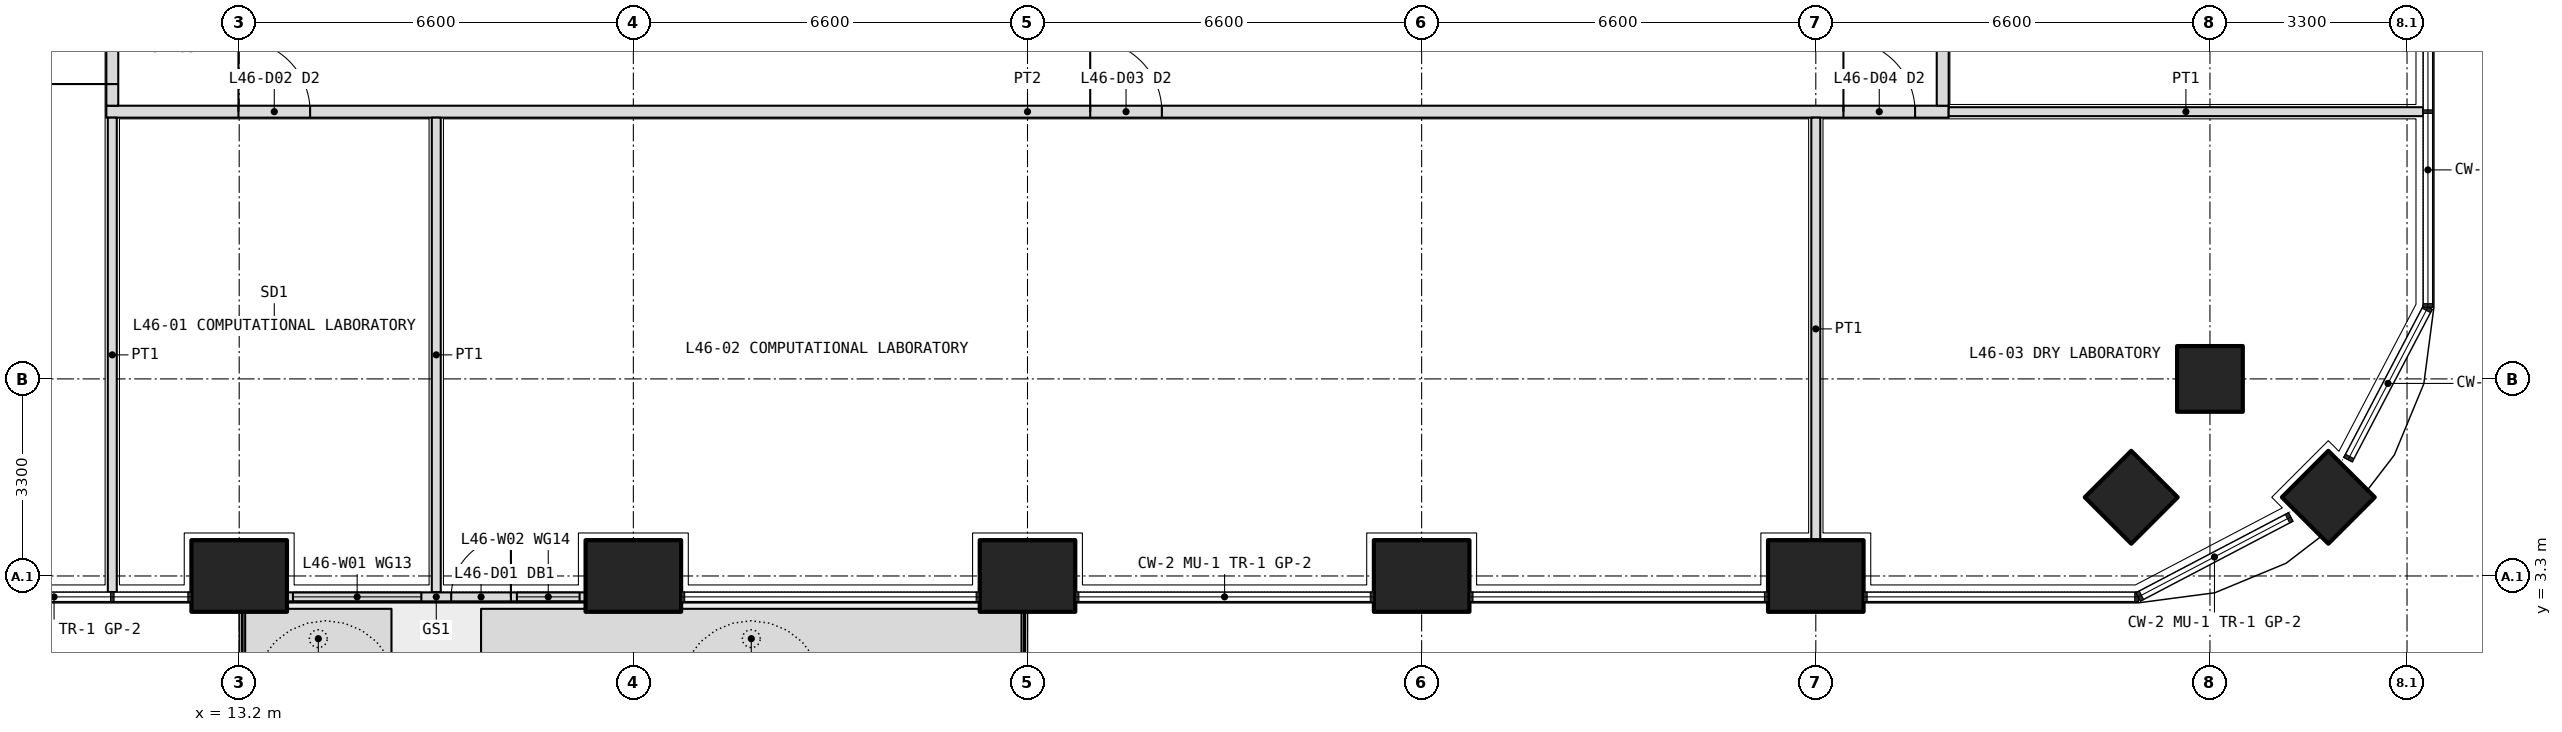
"""IFC4 building model, lengths in metres.
Left out: names, types, materials, properties, quantities, classifications, styles, units other than length and angle.
Written with IfcOpenShell. Run it as: python <this file> out.ifc"""

import sys

from ifc_helpers import new_model, si_unit, direction, frame, frame_2d, origin, origin_2d, place, context, subcontext, project, spatial, polyline, rectangle, outline, extrude, element, fill, save


model = new_model("IFC4")
c1 = context("Model", 3, precision=1e-05, world=origin(), true_north=direction((0.0, 1.0)))
c2 = subcontext(c1, "Body", "Model", "MODEL_VIEW")
j1 = project(units=[si_unit("LENGTHUNIT", "METRE"), si_unit("PLANEANGLEUNIT", "RADIAN")], contexts=[c1])
p1 = place(None, origin())
s1 = spatial("IfcSite", under=j1, at=p1, CompositionType="ELEMENT")
p2 = place(p1, origin())
s2 = spatial("IfcBuilding", under=s1, at=p2, CompositionType="ELEMENT")
p3 = place(p2, frame((0.0, 0.0, 201.9)))
s3 = spatial("IfcBuildingStorey", under=s2, at=p3, CompositionType="ELEMENT", Elevation=201.9)
p4 = place(p3, frame((48.182, 4.618, 0.0), z_axis=(0.0, 0.0, 1.0), x_axis=(0.707106781187, 0.707106781187, 0.0)))
e1 = element("IfcColumn", 1, at=p4, inside=s3, PredefinedType="COLUMN", context=c2, shape_type="SweptSolid", body=[
    extrude(rectangle(XDim=1.1, YDim=1.1, at=origin_2d()), origin(), (0.0, 0.0, 1.0), 4.2),
])
for number, where, z_axis, x_axis in (
    (2, (13.2, 3.3, 0.0), (0.0, 0.0, 1.0), (1.0, 0.0, 0.0)),
    (3, (19.8, 3.3, 0.0), (0.0, 0.0, 1.0), (1.0, 0.0, 0.0)),
    (4, (26.4, 3.3, 0.0), (0.0, 0.0, 1.0), (1.0, 0.0, 0.0)),
    (5, (33.0, 3.3, 0.0), (0.0, 0.0, 1.0), (1.0, 0.0, 0.0)),
    (6, (39.6, 3.3, 0.0), (0.0, 0.0, 1.0), (1.0, 0.0, 0.0)),
):
    element("IfcColumn", number, at=place(p3, frame(where, z_axis=z_axis, x_axis=x_axis)), inside=s3, PredefinedType="COLUMN", context=c2, shape_type="SweptSolid", body=[
        extrude(rectangle(XDim=1.6, YDim=1.2, at=origin_2d()), origin(), (0.0, 0.0, 1.0), 4.2),
    ])
for number, where, z_axis, x_axis in (
    (7, (46.2, 6.6, 0.0), (0.0, 0.0, 1.0), (1.0, 0.0, 0.0)),
    (8, (44.882, 4.618, 0.0), (0.0, 0.0, 1.0), (0.707, 0.707, 0.0)),
):
    element("IfcColumn", number, at=place(p3, frame(where, z_axis=z_axis, x_axis=x_axis)), inside=s3, PredefinedType="COLUMN", context=c2, shape_type="SweptSolid", body=[
        extrude(rectangle(XDim=1.1, YDim=1.1, at=origin_2d()), origin(), (0.0, 0.0, 1.0), 4.2),
    ])
p5 = place(p3, origin())
e9 = element("IfcWall", 9, at=p5, inside=s3, PredefinedType="USERDEFINED", context=c2, shape_type="SweptSolid", body=[
    extrude(outline(polyline([(13.3, 1.75), (15.75, 1.75), (15.75, 2.75), (13.3, 2.75), (13.3, 1.75)]), holes=[polyline([(13.45, 1.9), (15.6, 1.9), (15.6, 2.6), (13.45, 2.6), (13.45, 1.9)])]), origin(), (0.0, 0.0, 1.0), 1.05),
])
p6 = place(p3, origin())
e10 = element("IfcWall", 10, at=p6, inside=s3, PredefinedType="USERDEFINED", context=c2, shape_type="SweptSolid", body=[
    extrude(outline(polyline([(17.25, 1.75), (26.3, 1.75), (26.3, 2.75), (17.25, 2.75), (17.25, 1.75)]), holes=[polyline([(17.4, 1.9), (26.15, 1.9), (26.15, 2.6), (17.4, 2.6), (17.4, 1.9)])]), origin(), (0.0, 0.0, 1.0), 1.05),
])
p7 = place(p3, frame((14.0, 2.95, 0.0), z_axis=(0.0, 0.0, 1.0), x_axis=(1.0, 0.0, 0.0)))
e11 = element("IfcWall", 11, at=p7, inside=s3, PredefinedType="SOLIDWALL", context=c2, shape_type="SweptSolid", body=[
    extrude(rectangle(XDim=5.0, YDim=0.15, at=frame_2d((2.5, 0.0))), origin(), (0.0, 0.0, 1.0), 2.7),
])
p8 = place(p7, frame((2.75, 0.0, 0.0)))
e12 = element("IfcOpeningElement", 12, at=p8, cuts=e11, PredefinedType="OPENING", context=c2, shape_type="SweptSolid", body=[
    extrude(rectangle(XDim=1.0, YDim=2.4, at=frame_2d((0.5, 1.2))), frame((0.0, 0.085, 0.0), z_axis=(0.0, -1.0, 0.0), x_axis=(1.0, 0.0, 0.0)), (0.0, 0.0, 1.0), 0.17),
])
p9 = place(p7, frame((0.1, 0.0, 0.1)))
e13 = element("IfcOpeningElement", 13, at=p9, cuts=e11, PredefinedType="OPENING", context=c2, shape_type="SweptSolid", body=[
    extrude(rectangle(XDim=2.15, YDim=2.3, at=frame_2d((1.075, 1.15))), frame((0.0, 0.085, 0.0), z_axis=(0.0, -1.0, 0.0), x_axis=(1.0, 0.0, 0.0)), (0.0, 0.0, 1.0), 0.17),
])
p10 = place(p7, frame((3.85, 0.0, 0.1)))
e14 = element("IfcOpeningElement", 14, at=p10, cuts=e11, PredefinedType="OPENING", context=c2, shape_type="SweptSolid", body=[
    extrude(rectangle(XDim=1.05, YDim=2.3, at=frame_2d((0.525, 1.15))), frame((0.0, 0.085, 0.0), z_axis=(0.0, -1.0, 0.0), x_axis=(1.0, 0.0, 0.0)), (0.0, 0.0, 1.0), 0.17),
])
p11 = place(p3, frame((10.975, 11.075, 0.0), z_axis=(0.0, 0.0, 1.0), x_axis=(1.0, 0.0, 0.0)))
e15 = element("IfcWall", 15, at=p11, inside=s3, PredefinedType="PARTITIONING", context=c2, shape_type="SweptSolid", body=[
    extrude(rectangle(XDim=30.85, YDim=0.2, at=frame_2d((15.425, 0.0))), origin(), (0.0, 0.0, 1.0), 2.85),
])
p12 = place(p11, frame((2.212, 0.0, 0.0)))
e16 = element("IfcOpeningElement", 16, at=p12, cuts=e15, PredefinedType="OPENING", context=c2, shape_type="SweptSolid", body=[
    extrude(rectangle(XDim=1.2, YDim=2.1, at=frame_2d((0.6, 1.05))), frame((0.0, 0.11, 0.0), z_axis=(0.0, -1.0, 0.0), x_axis=(1.0, 0.0, 0.0)), (0.0, 0.0, 1.0), 0.22),
])
p13 = place(p11, frame((16.475, 0.0, 0.0)))
e17 = element("IfcOpeningElement", 17, at=p13, cuts=e15, PredefinedType="OPENING", context=c2, shape_type="SweptSolid", body=[
    extrude(rectangle(XDim=1.2, YDim=2.1, at=frame_2d((0.6, 1.05))), frame((0.0, 0.11, 0.0), z_axis=(0.0, -1.0, 0.0), x_axis=(1.0, 0.0, 0.0)), (0.0, 0.0, 1.0), 0.22),
])
p14 = place(p11, frame((29.087, 0.0, 0.0)))
e18 = element("IfcOpeningElement", 18, at=p14, cuts=e15, PredefinedType="OPENING", context=c2, shape_type="SweptSolid", body=[
    extrude(rectangle(XDim=1.2, YDim=2.1, at=frame_2d((0.6, 1.05))), frame((0.0, 0.11, 0.0), z_axis=(0.0, -1.0, 0.0), x_axis=(1.0, 0.0, 0.0)), (0.0, 0.0, 1.0), 0.22),
])
p15 = place(p3, frame((11.075, 11.175, 0.0), z_axis=(0.0, 0.0, 1.0), x_axis=(0.0, 1.0, 0.0)))
e19 = element("IfcWall", 19, at=p15, inside=s3, PredefinedType="PARTITIONING", context=c2, shape_type="SweptSolid", body=[
    extrude(rectangle(XDim=18.525, YDim=0.2, at=frame_2d((9.262, 0.0))), origin(), (0.0, 0.0, 1.0), 2.85),
])
p16 = place(p15, frame((0.363, 0.0, 0.0)))
e20 = element("IfcOpeningElement", 20, at=p16, cuts=e19, PredefinedType="OPENING", context=c2, shape_type="SweptSolid", body=[
    extrude(rectangle(XDim=1.2, YDim=2.1, at=frame_2d((0.6, 1.05))), frame((0.0, 0.11, 0.0), z_axis=(0.0, -1.0, 0.0), x_axis=(1.0, 0.0, 0.0)), (0.0, 0.0, 1.0), 0.22),
])
p17 = place(p15, frame((3.125, 0.0, 0.0)))
e21 = element("IfcOpeningElement", 21, at=p17, cuts=e19, PredefinedType="OPENING", context=c2, shape_type="SweptSolid", body=[
    extrude(rectangle(XDim=1.0, YDim=2.1, at=frame_2d((0.5, 1.05))), frame((0.0, 0.11, 0.0), z_axis=(0.0, -1.0, 0.0), x_axis=(1.0, 0.0, 0.0)), (0.0, 0.0, 1.0), 0.22),
])
p18 = place(p15, frame((6.475, 0.0, 0.0)))
e22 = element("IfcOpeningElement", 22, at=p18, cuts=e19, PredefinedType="OPENING", context=c2, shape_type="SweptSolid", body=[
    extrude(rectangle(XDim=0.9, YDim=2.1, at=frame_2d((0.45, 1.05))), frame((0.0, 0.11, 0.0), z_axis=(0.0, -1.0, 0.0), x_axis=(1.0, 0.0, 0.0)), (0.0, 0.0, 1.0), 0.22),
])
p19 = place(p15, frame((9.675, 0.0, 0.0)))
e23 = element("IfcOpeningElement", 23, at=p19, cuts=e19, PredefinedType="OPENING", context=c2, shape_type="SweptSolid", body=[
    extrude(rectangle(XDim=0.9, YDim=2.1, at=frame_2d((0.45, 1.05))), frame((0.0, 0.11, 0.0), z_axis=(0.0, -1.0, 0.0), x_axis=(1.0, 0.0, 0.0)), (0.0, 0.0, 1.0), 0.22),
])
p20 = place(p15, frame((12.925, 0.0, 0.0)))
e24 = element("IfcOpeningElement", 24, at=p20, cuts=e19, PredefinedType="OPENING", context=c2, shape_type="SweptSolid", body=[
    extrude(rectangle(XDim=1.0, YDim=2.1, at=frame_2d((0.5, 1.05))), frame((0.0, 0.11, 0.0), z_axis=(0.0, -1.0, 0.0), x_axis=(1.0, 0.0, 0.0)), (0.0, 0.0, 1.0), 0.22),
])
p21 = place(p15, frame((16.275, 0.0, 0.0)))
e25 = element("IfcOpeningElement", 25, at=p21, cuts=e19, PredefinedType="OPENING", context=c2, shape_type="SweptSolid", body=[
    extrude(rectangle(XDim=1.2, YDim=2.1, at=frame_2d((0.6, 1.05))), frame((0.0, 0.11, 0.0), z_axis=(0.0, -1.0, 0.0), x_axis=(1.0, 0.0, 0.0)), (0.0, 0.0, 1.0), 0.22),
])
p22 = place(p3, frame((41.725, 11.175, 0.0), z_axis=(0.0, 0.0, 1.0), x_axis=(0.0, 1.0, 0.0)))
e26 = element("IfcWall", 26, at=p22, inside=s3, PredefinedType="PARTITIONING", context=c2, shape_type="SweptSolid", body=[
    extrude(rectangle(XDim=23.85, YDim=0.2, at=frame_2d((11.925, 0.0))), origin(), (0.0, 0.0, 1.0), 2.85),
])
p23 = place(p22, frame((3.762, 0.0, 0.0)))
e27 = element("IfcOpeningElement", 27, at=p23, cuts=e26, PredefinedType="OPENING", context=c2, shape_type="SweptSolid", body=[
    extrude(rectangle(XDim=1.0, YDim=2.1, at=frame_2d((0.5, 1.05))), frame((0.0, 0.11, 0.0), z_axis=(0.0, -1.0, 0.0), x_axis=(1.0, 0.0, 0.0)), (0.0, 0.0, 1.0), 0.22),
])
p24 = place(p22, frame((9.625, 0.0, 0.0)))
e28 = element("IfcOpeningElement", 28, at=p24, cuts=e26, PredefinedType="OPENING", context=c2, shape_type="SweptSolid", body=[
    extrude(rectangle(XDim=1.0, YDim=2.1, at=frame_2d((0.5, 1.05))), frame((0.0, 0.11, 0.0), z_axis=(0.0, -1.0, 0.0), x_axis=(1.0, 0.0, 0.0)), (0.0, 0.0, 1.0), 0.22),
])
p25 = place(p22, frame((12.975, 0.0, 0.0)))
e29 = element("IfcOpeningElement", 29, at=p25, cuts=e26, PredefinedType="OPENING", context=c2, shape_type="SweptSolid", body=[
    extrude(rectangle(XDim=0.9, YDim=2.1, at=frame_2d((0.45, 1.05))), frame((0.0, 0.11, 0.0), z_axis=(0.0, -1.0, 0.0), x_axis=(1.0, 0.0, 0.0)), (0.0, 0.0, 1.0), 0.22),
])
p26 = place(p22, frame((16.275, 0.0, 0.0)))
e30 = element("IfcOpeningElement", 30, at=p26, cuts=e26, PredefinedType="OPENING", context=c2, shape_type="SweptSolid", body=[
    extrude(rectangle(XDim=1.2, YDim=2.1, at=frame_2d((0.6, 1.05))), frame((0.0, 0.11, 0.0), z_axis=(0.0, -1.0, 0.0), x_axis=(1.0, 0.0, 0.0)), (0.0, 0.0, 1.0), 0.22),
])
p27 = place(p22, frame((20.738, 0.0, 0.0)))
e31 = element("IfcOpeningElement", 31, at=p27, cuts=e26, PredefinedType="OPENING", context=c2, shape_type="SweptSolid", body=[
    extrude(rectangle(XDim=1.0, YDim=2.1, at=frame_2d((0.5, 1.05))), frame((0.0, 0.11, 0.0), z_axis=(0.0, -1.0, 0.0), x_axis=(1.0, 0.0, 0.0)), (0.0, 0.0, 1.0), 0.22),
])
for number, where, z_axis, x_axis in (
    (32, (11.075, 3.03, 0.0), (0.0, 0.0, 1.0), (0.0, 1.0, 0.0)),
    (33, (49.77, 11.075, 0.0), (0.0, 0.0, 1.0), (-1.0, 0.0, 0.0)),
    (34, (16.5, 3.03, 0.0), (0.0, 0.0, 1.0), (0.0, 1.0, 0.0)),
):
    element("IfcWall", number, at=place(p3, frame(where, z_axis=z_axis, x_axis=x_axis)), inside=s3, PredefinedType="PARTITIONING", context=c2, shape_type="SweptSolid", body=[
        extrude(rectangle(XDim=7.945, YDim=0.15, at=frame_2d((3.973, 0.0))), origin(), (0.0, 0.0, 1.0), 2.7),
    ])
p28 = place(p3, frame((39.6, 3.9, 0.0), z_axis=(0.0, 0.0, 1.0), x_axis=(0.0, 1.0, 0.0)))
e35 = element("IfcWall", 35, at=p28, inside=s3, PredefinedType="PARTITIONING", context=c2, shape_type="SweptSolid", body=[
    extrude(rectangle(XDim=7.075, YDim=0.15, at=frame_2d((3.538, 0.0))), origin(), (0.0, 0.0, 1.0), 2.85),
])
p29 = place(p8, origin())
e36 = element("IfcDoor", 36, at=p29, inside=s3, OperationType="SINGLE_SWING_RIGHT", PredefinedType="DOOR", context=c2, shape_type="SweptSolid", body=[
    extrude(rectangle(XDim=1.0, YDim=2.4, at=frame_2d((0.5, 1.2))), frame((0.0, 0.025, 0.0), z_axis=(0.0, -1.0, 0.0), x_axis=(1.0, 0.0, 0.0)), (0.0, 0.0, 1.0), 0.05),
])
fill(e12, e36)
p30 = place(p9, origin())
e37 = element("IfcWindow", 37, at=p30, inside=s3, PartitioningType="SINGLE_PANEL", PredefinedType="WINDOW", context=c2, shape_type="SweptSolid", body=[
    extrude(rectangle(XDim=2.15, YDim=2.3, at=frame_2d((1.075, 1.15))), frame((0.0, 0.03, 0.0), z_axis=(0.0, -1.0, 0.0), x_axis=(1.0, 0.0, 0.0)), (0.0, 0.0, 1.0), 0.06),
])
fill(e13, e37)
p31 = place(p10, origin())
e38 = element("IfcWindow", 38, at=p31, inside=s3, PartitioningType="SINGLE_PANEL", PredefinedType="WINDOW", context=c2, shape_type="SweptSolid", body=[
    extrude(rectangle(XDim=1.05, YDim=2.3, at=frame_2d((0.525, 1.15))), frame((0.0, 0.03, 0.0), z_axis=(0.0, -1.0, 0.0), x_axis=(1.0, 0.0, 0.0)), (0.0, 0.0, 1.0), 0.06),
])
fill(e14, e38)
p32 = place(p12, origin())
e39 = element("IfcDoor", 39, at=p32, inside=s3, OperationType="DOUBLE_DOOR_SINGLE_SWING", PredefinedType="DOOR", context=c2, shape_type="SweptSolid", body=[
    extrude(rectangle(XDim=1.2, YDim=2.1, at=frame_2d((0.6, 1.05))), frame((0.0, 0.025, 0.0), z_axis=(0.0, -1.0, 0.0), x_axis=(1.0, 0.0, 0.0)), (0.0, 0.0, 1.0), 0.05),
])
fill(e16, e39)
p33 = place(p13, origin())
e40 = element("IfcDoor", 40, at=p33, inside=s3, OperationType="DOUBLE_DOOR_SINGLE_SWING", PredefinedType="DOOR", context=c2, shape_type="SweptSolid", body=[
    extrude(rectangle(XDim=1.2, YDim=2.1, at=frame_2d((0.6, 1.05))), frame((0.0, 0.025, 0.0), z_axis=(0.0, -1.0, 0.0), x_axis=(1.0, 0.0, 0.0)), (0.0, 0.0, 1.0), 0.05),
])
fill(e17, e40)
p34 = place(p14, origin())
e41 = element("IfcDoor", 41, at=p34, inside=s3, OperationType="DOUBLE_DOOR_SINGLE_SWING", PredefinedType="DOOR", context=c2, shape_type="SweptSolid", body=[
    extrude(rectangle(XDim=1.2, YDim=2.1, at=frame_2d((0.6, 1.05))), frame((0.0, 0.025, 0.0), z_axis=(0.0, -1.0, 0.0), x_axis=(1.0, 0.0, 0.0)), (0.0, 0.0, 1.0), 0.05),
])
fill(e18, e41)
p35 = place(p16, origin())
e42 = element("IfcDoor", 42, at=p35, inside=s3, OperationType="DOUBLE_DOOR_SINGLE_SWING", PredefinedType="DOOR", context=c2, shape_type="SweptSolid", body=[
    extrude(rectangle(XDim=1.2, YDim=2.1, at=frame_2d((0.6, 1.05))), frame((0.0, 0.025, 0.0), z_axis=(0.0, -1.0, 0.0), x_axis=(1.0, 0.0, 0.0)), (0.0, 0.0, 1.0), 0.05),
])
fill(e20, e42)
save(model, sys.argv[1])
